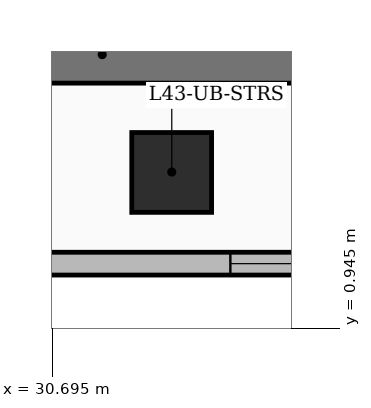
"""IFC4 building model, lengths in metres.
Left out: names, types, materials, properties, quantities, classifications, styles, units other than length and angle.
Written with IfcOpenShell. Run it as: python <this file> out.ifc"""

import sys

from ifc_helpers import new_model, si_unit, direction, frame, frame_2d, origin, origin_2d, place, context, subcontext, project, spatial, rectangle, extrude, element, fill, save


model = new_model("IFC4")
c1 = context("Model", 3, precision=1e-05, world=origin(), true_north=direction((0.0, 1.0)))
c2 = subcontext(c1, "Body", "Model", "MODEL_VIEW")
j1 = project(units=[si_unit("LENGTHUNIT", "METRE"), si_unit("PLANEANGLEUNIT", "RADIAN")], contexts=[c1])
p1 = place(None, origin())
s1 = spatial("IfcSite", under=j1, at=p1, CompositionType="ELEMENT")
p2 = place(p1, origin())
s2 = spatial("IfcBuilding", under=s1, at=p2, CompositionType="ELEMENT")
p3 = place(p2, frame((0.0, 0.0, 168.0)))
s3 = spatial("IfcBuildingStorey", under=s2, at=p3, CompositionType="ELEMENT", Elevation=168.0)
p4 = place(p3, frame((28.15, 4.55, 0.0), z_axis=(0.0, 0.0, 1.0), x_axis=(1.0, 0.0, 0.0)))
e1 = element("IfcWall", 1, at=p4, inside=s3, PredefinedType="SHEAR", context=c2, shape_type="SweptSolid", body=[
    extrude(rectangle(XDim=6.4, YDim=0.75, at=frame_2d((3.2, 0.0))), origin(), (0.0, 0.0, 1.0), 3.6),
])
p5 = place(p3, frame((32.264, 3.0, 0.0), z_axis=(0.0, 0.0, 1.0), x_axis=(1.0, 0.0, 0.0)))
e2 = element("IfcColumn", 2, at=p5, inside=s3, PredefinedType="COLUMN", context=c2, shape_type="SweptSolid", body=[
    extrude(rectangle(XDim=1.05, YDim=1.05, at=origin_2d()), origin(), (0.0, 0.0, 1.0), 3.6),
])
p6 = place(p3, frame((37.461, 1.8, 0.0), z_axis=(0.0, 0.0, 1.0), x_axis=(-1.0, 0.0, 0.0)))
e3 = element("IfcWall", 3, at=p6, inside=s3, PredefinedType="SOLIDWALL", context=c2, shape_type="SweptSolid", body=[
    extrude(rectangle(XDim=7.15, YDim=0.3, at=frame_2d((3.575, 0.0))), origin(), (0.0, 0.0, 1.0), 3.35),
])
p7 = place(p6, frame((2.325, 0.0, 0.55)))
e4 = element("IfcOpeningElement", 4, at=p7, cuts=e3, PredefinedType="OPENING", context=c2, shape_type="SweptSolid", body=[
    extrude(rectangle(XDim=2.1, YDim=2.4, at=frame_2d((1.05, 1.2))), frame((0.0, 0.16, 0.0), z_axis=(0.0, -1.0, 0.0), x_axis=(1.0, 0.0, 0.0)), (0.0, 0.0, 1.0), 0.32),
])
p8 = place(p7, origin())
e5 = element("IfcWindow", 5, at=p8, inside=s3, PartitioningType="SINGLE_PANEL", PredefinedType="WINDOW", context=c2, shape_type="SweptSolid", body=[
    extrude(rectangle(XDim=2.1, YDim=2.4, at=frame_2d((1.05, 1.2))), frame((0.0, 0.03, 0.0), z_axis=(0.0, -1.0, 0.0), x_axis=(1.0, 0.0, 0.0)), (0.0, 0.0, 1.0), 0.06),
])
fill(e4, e5)
save(model, sys.argv[1])
